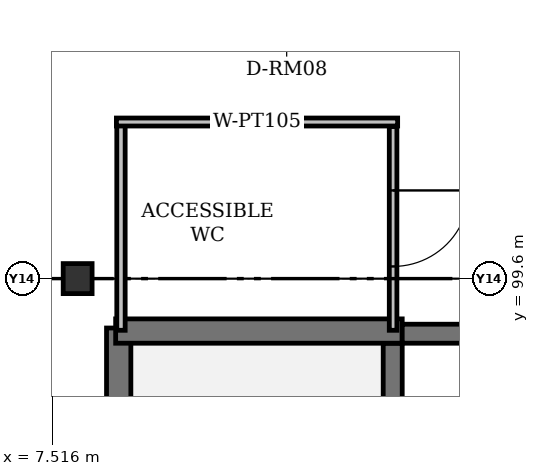
"""IFC4 building model, lengths in metres.
Left out: names, types, materials, properties, quantities, classifications, styles, units other than length and angle.
Written with IfcOpenShell. Run it as: python <this file> out.ifc"""

import sys

from ifc_helpers import new_model, si_unit, direction, frame, frame_2d, origin, origin_2d, place, context, subcontext, project, spatial, rectangle, i_section, extrude, element, fill, save


model = new_model("IFC4")
c1 = context("Model", 3, precision=1e-05, world=origin(), true_north=direction((0.0, 1.0)))
c2 = subcontext(c1, "Body", "Model", "MODEL_VIEW")
j1 = project(units=[si_unit("LENGTHUNIT", "METRE"), si_unit("PLANEANGLEUNIT", "RADIAN")], contexts=[c1])
p1 = place(None, origin())
s1 = spatial("IfcSite", under=j1, at=p1, CompositionType="ELEMENT")
p2 = place(p1, origin())
s2 = spatial("IfcBuilding", under=s1, at=p2, CompositionType="ELEMENT")
p3 = place(p2, frame((0.0, 0.0, 18.3)))
s3 = spatial("IfcBuildingStorey", under=s2, at=p3, CompositionType="ELEMENT", Elevation=18.3)
p4 = place(p3, frame((7.85, 99.6, 0.0), z_axis=(0.0, 0.0, 1.0), x_axis=(0.0, 1.0, 0.0)))
e1 = element("IfcColumn", 1, at=p4, inside=s3, PredefinedType="COLUMN", context=c2, shape_type="SweptSolid", body=[
    extrude(i_section(OverallWidth=0.395, OverallDepth=0.38, WebThickness=0.019, FlangeThickness=0.03, FilletRadius=0.015, at=origin_2d()), origin(), (0.0, 0.0, 1.0), 4.2),
])
p5 = place(p3, frame((8.39, 90.775, 0.0), z_axis=(0.0, 0.0, 1.0), x_axis=(0.0, 1.0, 0.0)))
e2 = element("IfcWall", 2, at=p5, inside=s3, PredefinedType="SHEAR", context=c2, shape_type="SweptSolid", body=[
    extrude(rectangle(XDim=8.175, YDim=0.32, at=frame_2d((4.087, 0.0))), origin(), (0.0, 0.0, 1.0), 4.2),
])
p6 = place(p3, frame((11.995, 90.9, 0.0), z_axis=(0.0, 0.0, 1.0), x_axis=(0.0, 1.0, 0.0)))
e3 = element("IfcWall", 3, at=p6, inside=s3, PredefinedType="SHEAR", context=c2, shape_type="SweptSolid", body=[
    extrude(rectangle(XDim=7.85, YDim=0.25, at=frame_2d((3.925, 0.0))), origin(), (0.0, 0.0, 1.0), 4.2),
])
p7 = place(p3, frame((8.35, 98.91, 0.0), z_axis=(0.0, 0.0, 1.0), x_axis=(1.0, 0.0, 0.0)))
e4 = element("IfcWall", 4, at=p7, inside=s3, PredefinedType="SHEAR", context=c2, shape_type="SweptSolid", body=[
    extrude(rectangle(XDim=3.77, YDim=0.32, at=frame_2d((1.885, 0.0))), origin(), (0.0, 0.0, 1.0), 4.2),
])
p8 = place(p3, frame((12.12, 98.875, 0.0), z_axis=(0.0, 0.0, 1.0), x_axis=(1.0, 0.0, 0.0)))
e5 = element("IfcWall", 5, at=p8, inside=s3, PredefinedType="SHEAR", context=c2, shape_type="SweptSolid", body=[
    extrude(rectangle(XDim=4.03, YDim=0.25, at=frame_2d((2.015, 0.0))), origin(), (0.0, 0.0, 1.0), 4.2),
])
p9 = place(p8, frame((1.35, 0.0, 0.0)))
e6 = element("IfcOpeningElement", 6, at=p9, cuts=e5, PredefinedType="OPENING", context=c2, shape_type="SweptSolid", body=[
    extrude(rectangle(XDim=1.3, YDim=2.2, at=frame_2d((0.65, 1.1))), frame((0.0, 0.125, 0.0), z_axis=(0.0, -1.0, 0.0), x_axis=(1.0, 0.0, 0.0)), (0.0, 0.0, 1.0), 0.25),
])
p10 = place(p3, frame((8.42, 98.92, 0.0), z_axis=(0.0, 0.0, 1.0), x_axis=(0.0, 1.0, 0.0)))
e7 = element("IfcWall", 7, at=p10, inside=s3, PredefinedType="PARTITIONING", context=c2, shape_type="SweptSolid", body=[
    extrude(rectangle(XDim=2.74, YDim=0.11, at=frame_2d((1.37, 0.0))), origin(), (0.0, 0.0, 1.0), 3.451),
])
p11 = place(p3, frame((8.36, 101.66, 0.0), z_axis=(0.0, 0.0, 1.0), x_axis=(1.0, 0.0, 0.0)))
e8 = element("IfcWall", 8, at=p11, inside=s3, PredefinedType="PARTITIONING", context=c2, shape_type="SweptSolid", body=[
    extrude(rectangle(XDim=3.7, YDim=0.105, at=frame_2d((1.85, 0.0))), origin(), (0.0, 0.0, 1.0), 3.95),
])
p12 = place(p3, frame((12.0, 101.6, 0.0), z_axis=(0.0, 0.0, 1.0), x_axis=(0.0, -1.0, 0.0)))
e9 = element("IfcWall", 9, at=p12, inside=s3, PredefinedType="PARTITIONING", context=c2, shape_type="SweptSolid", body=[
    extrude(rectangle(XDim=2.68, YDim=0.1, at=frame_2d((1.34, 0.0))), origin(), (0.0, 0.0, 1.0), 3.451),
])
p13 = place(p12, frame((0.84, 0.0, 0.0)))
e10 = element("IfcOpeningElement", 10, at=p13, cuts=e9, PredefinedType="OPENING", context=c2, shape_type="SweptSolid", body=[
    extrude(rectangle(XDim=1.0, YDim=2.25, at=frame_2d((0.5, 1.125))), frame((0.0, 0.05, 0.0), z_axis=(0.0, -1.0, 0.0), x_axis=(1.0, 0.0, 0.0)), (0.0, 0.0, 1.0), 0.1),
])
p14 = place(p13, origin())
e11 = element("IfcDoor", 11, at=p14, inside=s3, OperationType="SINGLE_SWING_LEFT", PredefinedType="DOOR", context=c2, shape_type="SweptSolid", body=[
    extrude(rectangle(XDim=1.0, YDim=2.25, at=frame_2d((0.5, 1.125))), frame((0.0, 0.025, 0.0), z_axis=(0.0, -1.0, 0.0), x_axis=(1.0, 0.0, 0.0)), (0.0, 0.0, 1.0), 0.05),
])
fill(e10, e11)
save(model, sys.argv[1])
